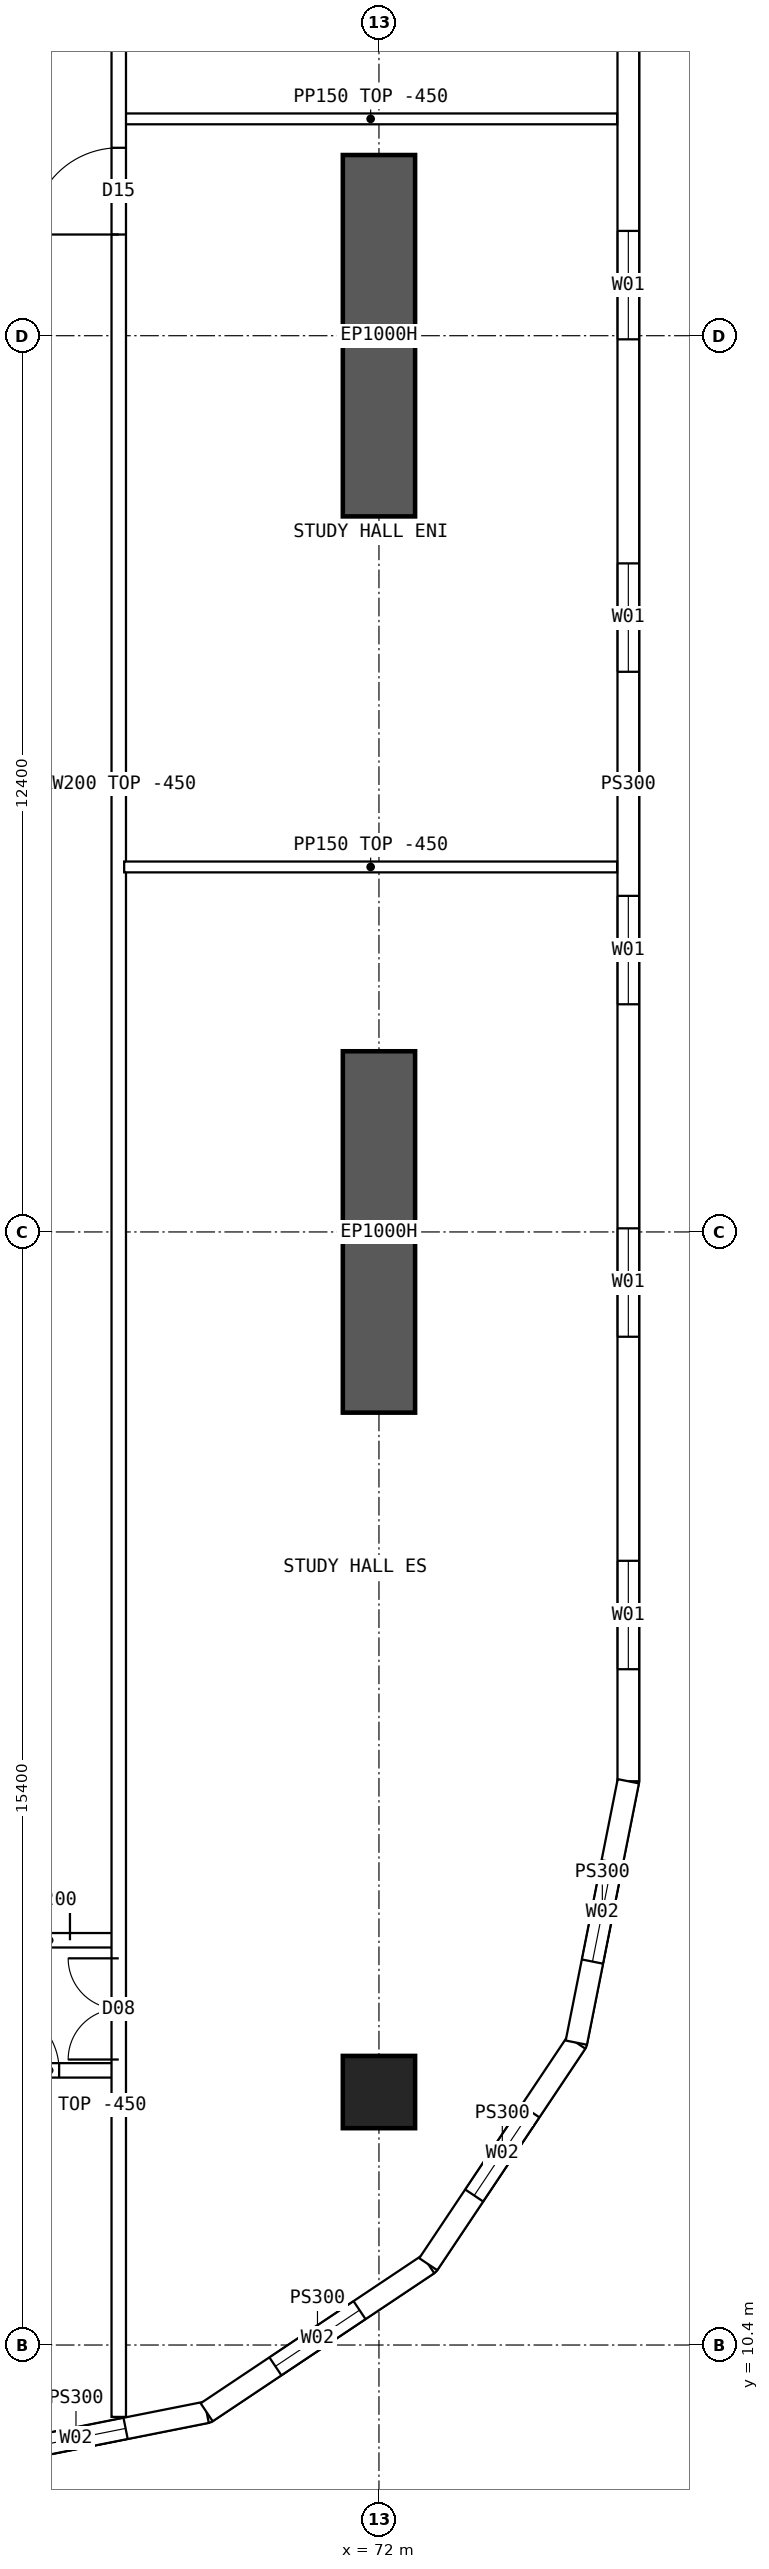
"""IFC4 building model, lengths in metres.
Left out: names, types, materials, properties, quantities, classifications, styles, units other than length and angle.
Written with IfcOpenShell. Run it as: python <this file> out.ifc"""

import sys

from ifc_helpers import new_model, si_unit, direction, frame, frame_2d, origin, origin_2d, place, context, subcontext, project, spatial, polyline, rectangle, hollow_rectangle, outline, extrude, element, fill, save


model = new_model("IFC4")
c1 = context("Model", 3, precision=1e-05, world=origin(), true_north=direction((0.0, 1.0)))
c2 = subcontext(c1, "Body", "Model", "MODEL_VIEW")
j1 = project(units=[si_unit("LENGTHUNIT", "METRE"), si_unit("PLANEANGLEUNIT", "RADIAN")], contexts=[c1])
p1 = place(None, origin())
s1 = spatial("IfcSite", under=j1, at=p1, CompositionType="ELEMENT")
p2 = place(p1, origin())
s2 = spatial("IfcBuilding", under=s1, at=p2, CompositionType="ELEMENT")
p3 = place(p2, frame((0.0, 0.0, 80.65)))
s3 = spatial("IfcBuildingStorey", under=s2, at=p3, CompositionType="ELEMENT", Elevation=80.65)
p4 = place(p3, frame((72.0, 13.9, 0.0), z_axis=(0.0, 0.0, 1.0), x_axis=(1.0, 0.0, 0.0)))
e1 = element("IfcColumn", 1, at=p4, inside=s3, PredefinedType="COLUMN", context=c2, shape_type="SweptSolid", body=[
    extrude(hollow_rectangle(XDim=1.0, YDim=1.0, WallThickness=0.1, at=origin_2d()), origin(), (0.0, 0.0, 1.0), 3.75),
])
for number, where, z_axis, x_axis in (
    (2, (72.0, 23.3, 0.0), (0.0, 0.0, 1.0), (0.0, 1.0, 0.0)),
    (3, (72.0, 35.7, 0.0), (0.0, 0.0, 1.0), (0.0, 1.0, 0.0)),
):
    element("IfcWall", number, at=place(p3, frame(where, z_axis=z_axis, x_axis=x_axis)), inside=s3, PredefinedType="SHEAR", context=c2, shape_type="SweptSolid", body=[
        extrude(rectangle(XDim=5.0, YDim=1.0, at=frame_2d((2.5, 0.0))), origin(), (0.0, 0.0, 1.0), 3.75),
    ])
p5 = place(p3, frame((75.45, 18.2, 0.0), z_axis=(0.0, 0.0, 1.0), x_axis=(0.0, 1.0, 0.0)))
e4 = element("IfcWall", 4, at=p5, inside=s3, PredefinedType="SOLIDWALL", context=c2, shape_type="SweptSolid", body=[
    extrude(outline(polyline([(-0.015, -0.15), (27.615, -0.15), (27.585, 0.15), (0.015, 0.15), (-0.015, -0.15)])), origin(), (0.0, 0.0, 1.0), 3.3),
])
p6 = place(p5, frame((1.55, 0.0, 0.9)))
e5 = element("IfcOpeningElement", 5, at=p6, cuts=e4, PredefinedType="OPENING", context=c2, shape_type="SweptSolid", body=[
    extrude(rectangle(XDim=1.5, YDim=2.0, at=frame_2d((0.75, 1.0))), frame((0.0, 0.16, 0.0), z_axis=(0.0, -1.0, 0.0), x_axis=(1.0, 0.0, 0.0)), (0.0, 0.0, 1.0), 0.32),
])
p7 = place(p5, frame((6.15, 0.0, 0.9)))
e6 = element("IfcOpeningElement", 6, at=p7, cuts=e4, PredefinedType="OPENING", context=c2, shape_type="SweptSolid", body=[
    extrude(rectangle(XDim=1.5, YDim=2.0, at=frame_2d((0.75, 1.0))), frame((0.0, 0.16, 0.0), z_axis=(0.0, -1.0, 0.0), x_axis=(1.0, 0.0, 0.0)), (0.0, 0.0, 1.0), 0.32),
])
p8 = place(p5, frame((10.75, 0.0, 0.9)))
e7 = element("IfcOpeningElement", 7, at=p8, cuts=e4, PredefinedType="OPENING", context=c2, shape_type="SweptSolid", body=[
    extrude(rectangle(XDim=1.5, YDim=2.0, at=frame_2d((0.75, 1.0))), frame((0.0, 0.16, 0.0), z_axis=(0.0, -1.0, 0.0), x_axis=(1.0, 0.0, 0.0)), (0.0, 0.0, 1.0), 0.32),
])
p9 = place(p5, frame((15.35, 0.0, 0.9)))
e8 = element("IfcOpeningElement", 8, at=p9, cuts=e4, PredefinedType="OPENING", context=c2, shape_type="SweptSolid", body=[
    extrude(rectangle(XDim=1.5, YDim=2.0, at=frame_2d((0.75, 1.0))), frame((0.0, 0.16, 0.0), z_axis=(0.0, -1.0, 0.0), x_axis=(1.0, 0.0, 0.0)), (0.0, 0.0, 1.0), 0.32),
])
p10 = place(p5, frame((19.95, 0.0, 0.9)))
e9 = element("IfcOpeningElement", 9, at=p10, cuts=e4, PredefinedType="OPENING", context=c2, shape_type="SweptSolid", body=[
    extrude(rectangle(XDim=1.5, YDim=2.0, at=frame_2d((0.75, 1.0))), frame((0.0, 0.16, 0.0), z_axis=(0.0, -1.0, 0.0), x_axis=(1.0, 0.0, 0.0)), (0.0, 0.0, 1.0), 0.32),
])
p11 = place(p5, frame((24.55, 0.0, 0.9)))
e10 = element("IfcOpeningElement", 10, at=p11, cuts=e4, PredefinedType="OPENING", context=c2, shape_type="SweptSolid", body=[
    extrude(rectangle(XDim=1.5, YDim=2.0, at=frame_2d((0.75, 1.0))), frame((0.0, 0.16, 0.0), z_axis=(0.0, -1.0, 0.0), x_axis=(1.0, 0.0, 0.0)), (0.0, 0.0, 1.0), 0.32),
])
p12 = place(p3, frame((66.0, 8.75, 0.0), z_axis=(0.0, 0.0, 1.0), x_axis=(0.980791473772, 0.195059183267, 0.0)))
e11 = element("IfcWall", 11, at=p12, inside=s3, PredefinedType="SOLIDWALL", context=c2, shape_type="SweptSolid", body=[
    extrude(outline(polyline([(-0.03, -0.15), (3.717, -0.15), (3.657, 0.15), (0.03, 0.15), (-0.03, -0.15)])), origin(), (0.0, 0.0, 1.0), 3.3),
])
p13 = place(p12, frame((1.144, 0.0, 0.9)))
e12 = element("IfcOpeningElement", 12, at=p13, cuts=e11, PredefinedType="OPENING", context=c2, shape_type="SweptSolid", body=[
    extrude(rectangle(XDim=1.4, YDim=1.8, at=frame_2d((0.7, 0.9))), frame((0.0, 0.16, 0.0), z_axis=(0.0, -1.0, 0.0), x_axis=(1.0, 0.0, 0.0)), (0.0, 0.0, 1.0), 0.32),
])
p14 = place(p3, frame((69.616, 9.469, 0.0), z_axis=(0.0, 0.0, 1.0), x_axis=(0.831448786846, 0.555601399253, 0.0)))
e13 = element("IfcWall", 13, at=p14, inside=s3, PredefinedType="SOLIDWALL", context=c2, shape_type="SweptSolid", body=[
    extrude(outline(polyline([(-0.03, -0.15), (3.717, -0.15), (3.657, 0.15), (0.03, 0.15), (-0.03, -0.15)])), origin(), (0.0, 0.0, 1.0), 3.3),
])
p15 = place(p14, frame((1.144, 0.0, 0.9)))
e14 = element("IfcOpeningElement", 14, at=p15, cuts=e13, PredefinedType="OPENING", context=c2, shape_type="SweptSolid", body=[
    extrude(rectangle(XDim=1.4, YDim=1.8, at=frame_2d((0.7, 0.9))), frame((0.0, 0.16, 0.0), z_axis=(0.0, -1.0, 0.0), x_axis=(1.0, 0.0, 0.0)), (0.0, 0.0, 1.0), 0.32),
])
p16 = place(p3, frame((72.682, 11.518, 0.0), z_axis=(0.0, 0.0, 1.0), x_axis=(0.555601399253, 0.831448786846, 0.0)))
e15 = element("IfcWall", 15, at=p16, inside=s3, PredefinedType="SOLIDWALL", context=c2, shape_type="SweptSolid", body=[
    extrude(outline(polyline([(-0.03, -0.15), (3.717, -0.15), (3.657, 0.15), (0.03, 0.15), (-0.03, -0.15)])), origin(), (0.0, 0.0, 1.0), 3.3),
])
p17 = place(p16, frame((1.144, 0.0, 0.9)))
e16 = element("IfcOpeningElement", 16, at=p17, cuts=e15, PredefinedType="OPENING", context=c2, shape_type="SweptSolid", body=[
    extrude(rectangle(XDim=1.4, YDim=1.8, at=frame_2d((0.7, 0.9))), frame((0.0, 0.16, 0.0), z_axis=(0.0, -1.0, 0.0), x_axis=(1.0, 0.0, 0.0)), (0.0, 0.0, 1.0), 0.32),
])
p18 = place(p3, frame((74.731, 14.583, 0.0), z_axis=(0.0, 0.0, 1.0), x_axis=(0.195059183267, 0.980791473772, 0.0)))
e17 = element("IfcWall", 17, at=p18, inside=s3, PredefinedType="SOLIDWALL", context=c2, shape_type="SweptSolid", body=[
    extrude(outline(polyline([(-0.03, -0.15), (3.702, -0.15), (3.672, 0.15), (0.03, 0.15), (-0.03, -0.15)])), origin(), (0.0, 0.0, 1.0), 3.3),
])
p19 = place(p18, frame((1.144, 0.0, 0.9)))
e18 = element("IfcOpeningElement", 18, at=p19, cuts=e17, PredefinedType="OPENING", context=c2, shape_type="SweptSolid", body=[
    extrude(rectangle(XDim=1.4, YDim=1.8, at=frame_2d((0.7, 0.9))), frame((0.0, 0.16, 0.0), z_axis=(0.0, -1.0, 0.0), x_axis=(1.0, 0.0, 0.0)), (0.0, 0.0, 1.0), 0.32),
])
p20 = place(p3, frame((66.475, 14.2, 0.0), z_axis=(0.0, 0.0, 1.0), x_axis=(1.0, 0.0, 0.0)))
e19 = element("IfcWall", 19, at=p20, inside=s3, PredefinedType="SOLIDWALL", context=c2, shape_type="SweptSolid", body=[
    extrude(rectangle(XDim=1.925, YDim=0.2, at=frame_2d((0.962, 0.0))), origin(), (0.0, 0.0, 1.0), 3.3),
])
p21 = place(p20, frame((0.2, 0.0, 0.0)))
e20 = element("IfcOpeningElement", 20, at=p21, cuts=e19, PredefinedType="OPENING", context=c2, shape_type="SweptSolid", body=[
    extrude(rectangle(XDim=0.9, YDim=2.1, at=frame_2d((0.45, 1.05))), frame((0.0, 0.11, 0.0), z_axis=(0.0, -1.0, 0.0), x_axis=(1.0, 0.0, 0.0)), (0.0, 0.0, 1.0), 0.22),
])
p22 = place(p3, frame((66.475, 16.0, 0.0), z_axis=(0.0, 0.0, 1.0), x_axis=(1.0, 0.0, 0.0)))
e21 = element("IfcWall", 21, at=p22, inside=s3, PredefinedType="SOLIDWALL", context=c2, shape_type="SweptSolid", body=[
    extrude(rectangle(XDim=1.925, YDim=0.2, at=frame_2d((0.962, 0.0))), origin(), (0.0, 0.0, 1.0), 3.3),
])
p23 = place(p22, frame((0.05, 0.0, 0.0)))
e22 = element("IfcOpeningElement", 22, at=p23, cuts=e21, PredefinedType="OPENING", context=c2, shape_type="SweptSolid", body=[
    extrude(rectangle(XDim=1.2, YDim=2.1, at=frame_2d((0.6, 1.05))), frame((0.0, 0.11, 0.0), z_axis=(0.0, -1.0, 0.0), x_axis=(1.0, 0.0, 0.0)), (0.0, 0.0, 1.0), 0.22),
])
p24 = place(p3, frame((68.475, 30.85, 0.0), z_axis=(0.0, 0.0, 1.0), x_axis=(1.0, 0.0, 0.0)))
e23 = element("IfcWall", 23, at=p24, inside=s3, PredefinedType="PARTITIONING", context=c2, shape_type="SweptSolid", body=[
    extrude(outline(polyline([(0.0, 0.0), (6.82, 0.0), (6.82, 3.3), (3.827, 3.3), (3.825, 2.85), (3.227, 2.85), (3.225, 3.3), (0.0, 3.3), (0.0, 0.0)])), frame((0.0, 0.075, 0.0), z_axis=(0.0, -1.0, 0.0), x_axis=(1.0, 0.0, 0.0)), (0.0, 0.0, 1.0), 0.15),
])
p25 = place(p3, frame((68.4, 9.405, 0.0), z_axis=(0.0, 0.0, 1.0), x_axis=(0.0, 1.0, 0.0)))
e24 = element("IfcWall", 24, at=p25, inside=s3, PredefinedType="SOLIDWALL", context=c2, shape_type="SweptSolid", body=[
    extrude(rectangle(XDim=45.189, YDim=0.2, at=frame_2d((22.595, 0.0))), origin(), (0.0, 0.0, 1.0), 3.3),
])
p26 = place(p25, frame((30.195, 0.0, 0.0)))
e25 = element("IfcOpeningElement", 25, at=p26, cuts=e24, PredefinedType="OPENING", context=c2, shape_type="SweptSolid", body=[
    extrude(rectangle(XDim=1.2, YDim=2.1, at=frame_2d((0.6, 1.05))), frame((0.0, 0.11, 0.0), z_axis=(0.0, -1.0, 0.0), x_axis=(1.0, 0.0, 0.0)), (0.0, 0.0, 1.0), 0.22),
])
p27 = place(p25, frame((4.945, 0.0, 0.0)))
e26 = element("IfcOpeningElement", 26, at=p27, cuts=e24, PredefinedType="OPENING", context=c2, shape_type="SweptSolid", body=[
    extrude(rectangle(XDim=1.4, YDim=2.1, at=frame_2d((0.7, 1.05))), frame((0.0, 0.11, 0.0), z_axis=(0.0, -1.0, 0.0), x_axis=(1.0, 0.0, 0.0)), (0.0, 0.0, 1.0), 0.22),
])
p28 = place(p25, frame((38.745, 0.0, 0.0)))
e27 = element("IfcOpeningElement", 27, at=p28, cuts=e24, PredefinedType="OPENING", context=c2, shape_type="SweptSolid", body=[
    extrude(rectangle(XDim=1.4, YDim=2.1, at=frame_2d((0.7, 1.05))), frame((0.0, 0.11, 0.0), z_axis=(0.0, -1.0, 0.0), x_axis=(1.0, 0.0, 0.0)), (0.0, 0.0, 1.0), 0.22),
])
p29 = place(p3, frame((68.475, 41.2, 0.0), z_axis=(0.0, 0.0, 1.0), x_axis=(1.0, 0.0, 0.0)))
e28 = element("IfcWall", 28, at=p29, inside=s3, PredefinedType="PARTITIONING", context=c2, shape_type="SweptSolid", body=[
    extrude(outline(polyline([(0.0, 0.0), (6.82, 0.0), (6.82, 3.3), (3.827, 3.3), (3.825, 2.85), (3.227, 2.85), (3.225, 3.3), (0.0, 3.3), (0.0, 0.0)])), frame((0.0, 0.075, 0.0), z_axis=(0.0, -1.0, 0.0), x_axis=(1.0, 0.0, 0.0)), (0.0, 0.0, 1.0), 0.15),
])
p30 = place(p6, origin())
e29 = element("IfcWindow", 29, at=p30, inside=s3, PartitioningType="SINGLE_PANEL", PredefinedType="WINDOW", context=c2, shape_type="SweptSolid", body=[
    extrude(rectangle(XDim=1.5, YDim=2.0, at=frame_2d((0.75, 1.0))), frame((0.0, 0.03, 0.0), z_axis=(0.0, -1.0, 0.0), x_axis=(1.0, 0.0, 0.0)), (0.0, 0.0, 1.0), 0.06),
])
fill(e5, e29)
p31 = place(p7, origin())
e30 = element("IfcWindow", 30, at=p31, inside=s3, PartitioningType="SINGLE_PANEL", PredefinedType="WINDOW", context=c2, shape_type="SweptSolid", body=[
    extrude(rectangle(XDim=1.5, YDim=2.0, at=frame_2d((0.75, 1.0))), frame((0.0, 0.03, 0.0), z_axis=(0.0, -1.0, 0.0), x_axis=(1.0, 0.0, 0.0)), (0.0, 0.0, 1.0), 0.06),
])
fill(e6, e30)
p32 = place(p8, origin())
e31 = element("IfcWindow", 31, at=p32, inside=s3, PartitioningType="SINGLE_PANEL", PredefinedType="WINDOW", context=c2, shape_type="SweptSolid", body=[
    extrude(rectangle(XDim=1.5, YDim=2.0, at=frame_2d((0.75, 1.0))), frame((0.0, 0.03, 0.0), z_axis=(0.0, -1.0, 0.0), x_axis=(1.0, 0.0, 0.0)), (0.0, 0.0, 1.0), 0.06),
])
fill(e7, e31)
p33 = place(p9, origin())
e32 = element("IfcWindow", 32, at=p33, inside=s3, PartitioningType="SINGLE_PANEL", PredefinedType="WINDOW", context=c2, shape_type="SweptSolid", body=[
    extrude(rectangle(XDim=1.5, YDim=2.0, at=frame_2d((0.75, 1.0))), frame((0.0, 0.03, 0.0), z_axis=(0.0, -1.0, 0.0), x_axis=(1.0, 0.0, 0.0)), (0.0, 0.0, 1.0), 0.06),
])
fill(e8, e32)
p34 = place(p10, origin())
e33 = element("IfcWindow", 33, at=p34, inside=s3, PartitioningType="SINGLE_PANEL", PredefinedType="WINDOW", context=c2, shape_type="SweptSolid", body=[
    extrude(rectangle(XDim=1.5, YDim=2.0, at=frame_2d((0.75, 1.0))), frame((0.0, 0.03, 0.0), z_axis=(0.0, -1.0, 0.0), x_axis=(1.0, 0.0, 0.0)), (0.0, 0.0, 1.0), 0.06),
])
fill(e9, e33)
p35 = place(p13, origin())
e34 = element("IfcWindow", 34, at=p35, inside=s3, PartitioningType="SINGLE_PANEL", PredefinedType="WINDOW", context=c2, shape_type="SweptSolid", body=[
    extrude(rectangle(XDim=1.4, YDim=1.8, at=frame_2d((0.7, 0.9))), frame((0.0, 0.03, 0.0), z_axis=(0.0, -1.0, 0.0), x_axis=(1.0, 0.0, 0.0)), (0.0, 0.0, 1.0), 0.06),
])
fill(e12, e34)
p36 = place(p15, origin())
e35 = element("IfcWindow", 35, at=p36, inside=s3, PartitioningType="SINGLE_PANEL", PredefinedType="WINDOW", context=c2, shape_type="SweptSolid", body=[
    extrude(rectangle(XDim=1.4, YDim=1.8, at=frame_2d((0.7, 0.9))), frame((0.0, 0.03, 0.0), z_axis=(0.0, -1.0, 0.0), x_axis=(1.0, 0.0, 0.0)), (0.0, 0.0, 1.0), 0.06),
])
fill(e14, e35)
p37 = place(p17, origin())
e36 = element("IfcWindow", 36, at=p37, inside=s3, PartitioningType="SINGLE_PANEL", PredefinedType="WINDOW", context=c2, shape_type="SweptSolid", body=[
    extrude(rectangle(XDim=1.4, YDim=1.8, at=frame_2d((0.7, 0.9))), frame((0.0, 0.03, 0.0), z_axis=(0.0, -1.0, 0.0), x_axis=(1.0, 0.0, 0.0)), (0.0, 0.0, 1.0), 0.06),
])
fill(e16, e36)
p38 = place(p19, origin())
e37 = element("IfcWindow", 37, at=p38, inside=s3, PartitioningType="SINGLE_PANEL", PredefinedType="WINDOW", context=c2, shape_type="SweptSolid", body=[
    extrude(rectangle(XDim=1.4, YDim=1.8, at=frame_2d((0.7, 0.9))), frame((0.0, 0.03, 0.0), z_axis=(0.0, -1.0, 0.0), x_axis=(1.0, 0.0, 0.0)), (0.0, 0.0, 1.0), 0.06),
])
fill(e18, e37)
p39 = place(p23, origin())
e38 = element("IfcDoor", 38, at=p39, inside=s3, OperationType="DOUBLE_DOOR_SINGLE_SWING", PredefinedType="DOOR", context=c2, shape_type="SweptSolid", body=[
    extrude(rectangle(XDim=1.2, YDim=2.1, at=frame_2d((0.6, 1.05))), frame((0.0, 0.025, 0.0), z_axis=(0.0, -1.0, 0.0), x_axis=(1.0, 0.0, 0.0)), (0.0, 0.0, 1.0), 0.05),
])
fill(e22, e38)
p40 = place(p26, origin())
e39 = element("IfcDoor", 39, at=p40, inside=s3, OperationType="SINGLE_SWING_LEFT", PredefinedType="DOOR", context=c2, shape_type="SweptSolid", body=[
    extrude(rectangle(XDim=1.2, YDim=2.1, at=frame_2d((0.6, 1.05))), frame((0.0, 0.025, 0.0), z_axis=(0.0, -1.0, 0.0), x_axis=(1.0, 0.0, 0.0)), (0.0, 0.0, 1.0), 0.05),
])
fill(e25, e39)
p41 = place(p27, origin())
e40 = element("IfcDoor", 40, at=p41, inside=s3, OperationType="DOUBLE_DOOR_SINGLE_SWING", PredefinedType="DOOR", context=c2, shape_type="SweptSolid", body=[
    extrude(rectangle(XDim=1.4, YDim=2.1, at=frame_2d((0.7, 1.05))), frame((0.0, 0.025, 0.0), z_axis=(0.0, -1.0, 0.0), x_axis=(1.0, 0.0, 0.0)), (0.0, 0.0, 1.0), 0.05),
])
fill(e26, e40)
p42 = place(p21, origin())
e41 = element("IfcDoor", 41, at=p42, inside=s3, OperationType="SINGLE_SWING_LEFT", PredefinedType="DOOR", context=c2, shape_type="SweptSolid", body=[
    extrude(rectangle(XDim=0.9, YDim=2.1, at=frame_2d((0.45, 1.05))), frame((0.0, 0.025, 0.0), z_axis=(0.0, -1.0, 0.0), x_axis=(1.0, 0.0, 0.0)), (0.0, 0.0, 1.0), 0.05),
])
fill(e20, e41)
save(model, sys.argv[1])
